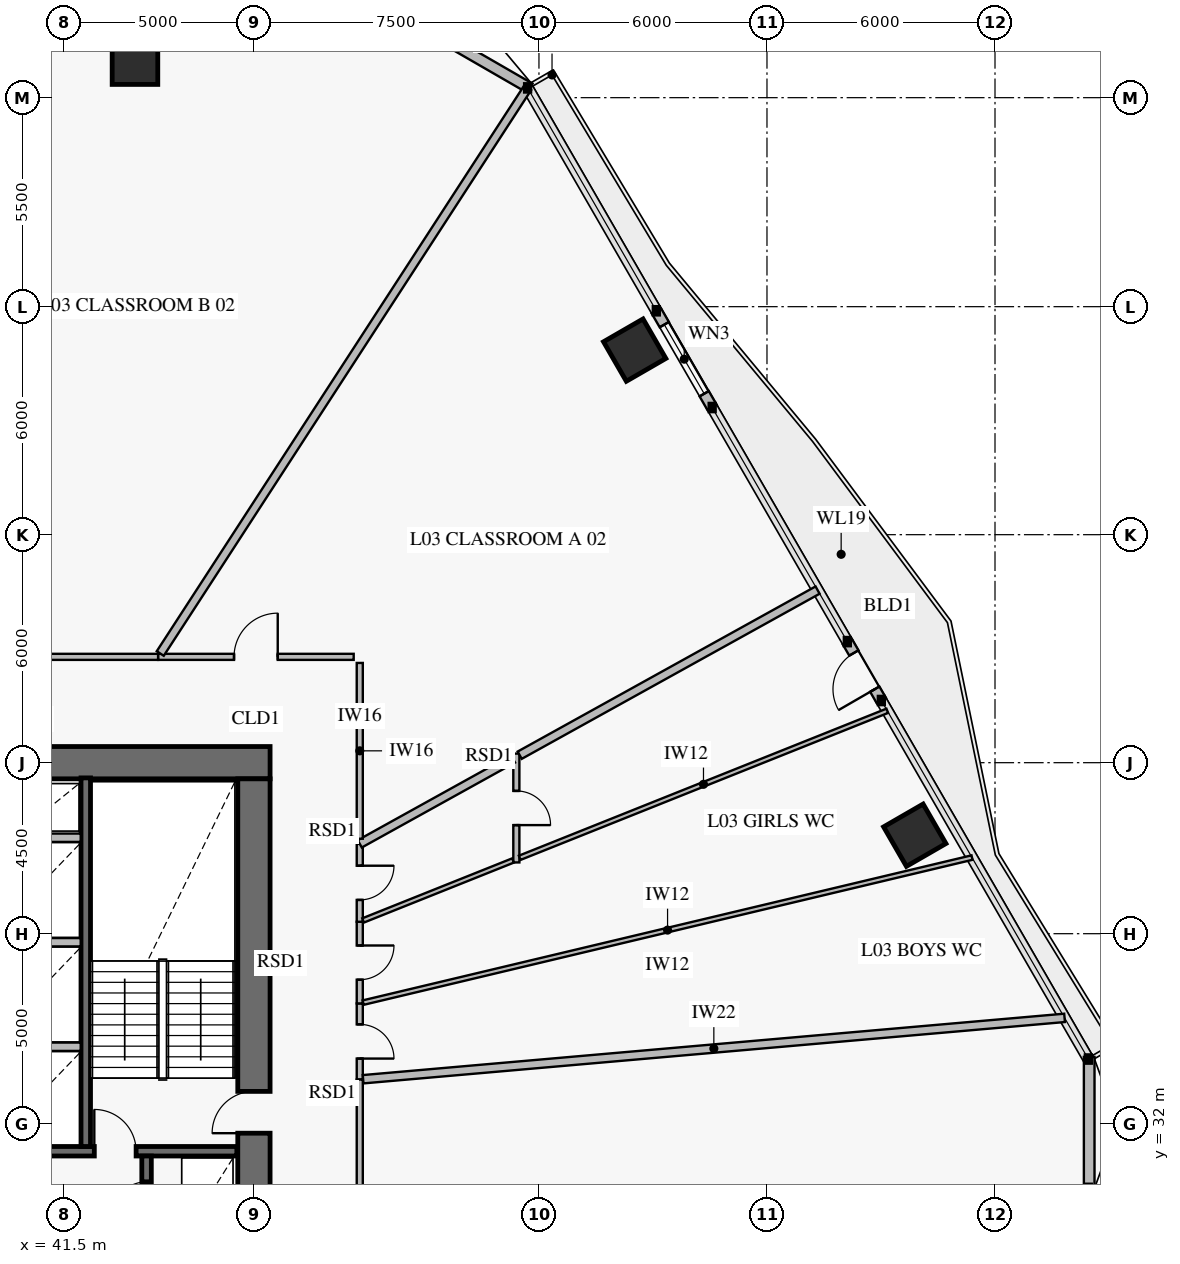
"""IFC4 building model, lengths in metres.
Left out: names, types, materials, properties, quantities, classifications, styles, units other than length and angle.
Written with IfcOpenShell. Run it as: python <this file> out.ifc"""

import sys

from ifc_helpers import new_model, si_unit, direction, frame, frame_2d, origin, origin_2d, place, context, subcontext, project, spatial, rectangle, extrude, element, fill, save


model = new_model("IFC4")
c1 = context("Model", 3, precision=1e-05, world=origin(), true_north=direction((0.0, 1.0)))
c2 = subcontext(c1, "Body", "Model", "MODEL_VIEW")
j1 = project(units=[si_unit("LENGTHUNIT", "METRE"), si_unit("PLANEANGLEUNIT", "RADIAN")], contexts=[c1])
p1 = place(None, origin())
s1 = spatial("IfcSite", under=j1, at=p1, CompositionType="ELEMENT")
p2 = place(p1, origin())
s2 = spatial("IfcBuilding", under=s1, at=p2, CompositionType="ELEMENT")
p3 = place(p2, frame((0.0, 0.0, 12.0)))
s3 = spatial("IfcBuildingStorey", under=s2, at=p3, CompositionType="ELEMENT", Elevation=12.0)
p4 = place(p3, frame((46.925, 41.5, 0.0), z_axis=(0.0, 0.0, 1.0), x_axis=(-1.0, 0.0, 0.0)))
e1 = element("IfcWall", 1, at=p4, inside=s3, PredefinedType="SHEAR", context=c2, shape_type="SweptSolid", body=[
    extrude(rectangle(XDim=7.975, YDim=0.85, at=frame_2d((3.988, 0.0))), origin(), (0.0, 0.0, 1.0), 4.2),
])
p5 = place(p3, frame((46.5, 22.925, 0.0), z_axis=(0.0, 0.0, 1.0), x_axis=(0.0, 1.0, 0.0)))
e2 = element("IfcWall", 2, at=p5, inside=s3, PredefinedType="SHEAR", context=c2, shape_type="SweptSolid", body=[
    extrude(rectangle(XDim=18.15, YDim=0.85, at=frame_2d((9.075, 0.0))), origin(), (0.0, 0.0, 1.0), 4.2),
])
p6 = place(p5, frame((8.825, 0.0, 0.0)))
e3 = element("IfcOpeningElement", 3, at=p6, cuts=e2, PredefinedType="OPENING", context=c2, shape_type="SweptSolid", body=[
    extrude(rectangle(XDim=1.1, YDim=2.15, at=frame_2d((0.55, 1.075))), frame((0.0, 0.437, 0.0), z_axis=(0.0, -1.0, 0.0), x_axis=(1.0, 0.0, 0.0)), (0.0, 0.0, 1.0), 0.874),
])
for number, where, z_axis, x_axis in (
    (4, (63.889, 39.592, 0.0), (0.0, 0.0, 1.0), (-0.5, 0.866, 0.0)),
    (5, (56.519, 52.357, 0.0), (0.0, 0.0, 1.0), (-0.5, 0.866, 0.0)),
    (6, (43.37, 59.948, 0.0), (0.0, 0.0, 1.0), (-1.0, 0.0, 0.0)),
):
    element("IfcColumn", number, at=place(p3, frame(where, z_axis=z_axis, x_axis=x_axis)), inside=s3, PredefinedType="COLUMN", context=c2, shape_type="SweptSolid", body=[
        extrude(rectangle(XDim=1.2, YDim=1.2, at=origin_2d()), origin(), (0.0, 0.0, 1.0), 3.92),
    ])
p7 = place(p3, frame((50.717, 61.006, 0.0), z_axis=(0.0, 0.0, 1.0), x_axis=(0.866007452331, -0.500031091541, 0.0)))
e7 = element("IfcWall", 7, at=p7, inside=s3, PredefinedType="SOLIDWALL", context=c2, shape_type="SweptSolid", body=[
    extrude(rectangle(XDim=3.515, YDim=0.28, at=frame_2d((1.757, 0.0))), origin(), (0.0, 0.0, 1.0), 3.92),
])
p8 = place(p3, frame((57.088, 53.392, 0.0), z_axis=(0.0, 0.0, 1.0), x_axis=(0.500024377727, -0.866011328839, 0.0)))
e8 = element("IfcWall", 8, at=p8, inside=s3, PredefinedType="SOLIDWALL", context=c2, shape_type="SweptSolid", body=[
    extrude(rectangle(XDim=2.94, YDim=0.28, at=frame_2d((1.47, 0.0))), origin(), (0.0, 0.0, 1.0), 3.492),
])
p9 = place(p8, frame((0.42, 0.0, 0.7)))
e9 = element("IfcOpeningElement", 9, at=p9, cuts=e8, PredefinedType="OPENING", context=c2, shape_type="SweptSolid", body=[
    extrude(rectangle(XDim=2.1, YDim=1.5, at=frame_2d((1.05, 0.75))), frame((0.0, 0.152, 0.0), z_axis=(0.0, -1.0, 0.0), x_axis=(1.0, 0.0, 0.0)), (0.0, 0.0, 1.0), 0.304),
])
p10 = place(p3, frame((62.114, 44.686, 0.0), z_axis=(0.0, 0.0, 1.0), x_axis=(0.499982180423, -0.866035691677, 0.0)))
e10 = element("IfcWall", 10, at=p10, inside=s3, PredefinedType="SOLIDWALL", context=c2, shape_type="SweptSolid", body=[
    extrude(rectangle(XDim=1.79, YDim=0.28, at=frame_2d((0.895, 0.0))), origin(), (0.0, 0.0, 1.0), 3.92),
])
p11 = place(p10, frame((0.345, 0.0, 0.0)))
e11 = element("IfcOpeningElement", 11, at=p11, cuts=e10, PredefinedType="OPENING", context=c2, shape_type="SweptSolid", body=[
    extrude(rectangle(XDim=1.1, YDim=2.2, at=frame_2d((0.55, 1.1))), frame((0.0, 0.152, 0.0), z_axis=(0.0, -1.0, 0.0), x_axis=(1.0, 0.0, 0.0)), (0.0, 0.0, 1.0), 0.304),
])
p12 = place(p3, frame((68.479, 33.758, 0.0), z_axis=(0.0, 0.0, 1.0), x_axis=(0.0, -1.0, 0.0)))
e12 = element("IfcWall", 12, at=p12, inside=s3, PredefinedType="SOLIDWALL", context=c2, shape_type="SweptSolid", body=[
    extrude(rectangle(XDim=3.515, YDim=0.28, at=frame_2d((1.758, 0.0))), origin(), (0.0, 0.0, 1.0), 3.92),
])
p13 = place(p3, frame((25.95, 31.275, 0.0), z_axis=(0.0, 0.0, 1.0), x_axis=(1.0, 0.0, 0.0)))
e13 = element("IfcWall", 13, at=p13, inside=s3, PredefinedType="SOLIDWALL", context=c2, shape_type="SweptSolid", body=[
    extrude(rectangle(XDim=20.1, YDim=0.25, at=frame_2d((10.05, 0.0))), origin(), (0.0, 0.0, 1.0), 4.2),
])
p14 = place(p13, frame((2.6, 0.0, 0.0)))
e14 = element("IfcOpeningElement", 14, at=p14, cuts=e13, PredefinedType="OPENING", context=c2, shape_type="SweptSolid", body=[
    extrude(rectangle(XDim=1.1, YDim=2.15, at=frame_2d((0.55, 1.075))), frame((0.0, 0.137, 0.0), z_axis=(0.0, -1.0, 0.0), x_axis=(1.0, 0.0, 0.0)), (0.0, 0.0, 1.0), 0.274),
])
p15 = place(p13, frame((10.6, 0.0, 0.0)))
e15 = element("IfcOpeningElement", 15, at=p15, cuts=e13, PredefinedType="OPENING", context=c2, shape_type="SweptSolid", body=[
    extrude(rectangle(XDim=1.1, YDim=2.15, at=frame_2d((0.55, 1.075))), frame((0.0, 0.137, 0.0), z_axis=(0.0, -1.0, 0.0), x_axis=(1.0, 0.0, 0.0)), (0.0, 0.0, 1.0), 0.274),
])
p16 = place(p13, frame((16.35, 0.0, 0.0)))
e16 = element("IfcOpeningElement", 16, at=p16, cuts=e13, PredefinedType="OPENING", context=c2, shape_type="SweptSolid", body=[
    extrude(rectangle(XDim=1.1, YDim=2.15, at=frame_2d((0.55, 1.075))), frame((0.0, 0.137, 0.0), z_axis=(0.0, -1.0, 0.0), x_axis=(1.0, 0.0, 0.0)), (0.0, 0.0, 1.0), 0.274),
])
p17 = place(p3, frame((42.075, 31.4, 0.0), z_axis=(0.0, 0.0, 1.0), x_axis=(0.0, 1.0, 0.0)))
e17 = element("IfcWall", 17, at=p17, inside=s3, PredefinedType="SOLIDWALL", context=c2, shape_type="SweptSolid", body=[
    extrude(rectangle(XDim=9.7, YDim=0.25, at=frame_2d((4.85, 0.0))), origin(), (0.0, 0.0, 1.0), 4.2),
])
p18 = place(p3, frame((43.675, 22.95, 0.0), z_axis=(0.0, 0.0, 1.0), x_axis=(0.0, 1.0, 0.0)))
e18 = element("IfcWall", 18, at=p18, inside=s3, PredefinedType="SOLIDWALL", context=c2, shape_type="SweptSolid", body=[
    extrude(rectangle(XDim=8.2, YDim=0.25, at=frame_2d((4.1, 0.0))), origin(), (0.0, 0.0, 1.0), 4.2),
])
p19 = place(p18, frame((0.75, 0.0, 0.0)))
e19 = element("IfcOpeningElement", 19, at=p19, cuts=e18, PredefinedType="OPENING", context=c2, shape_type="SweptSolid", body=[
    extrude(rectangle(XDim=1.3, YDim=2.3, at=frame_2d((0.65, 1.15))), frame((0.0, 0.137, 0.0), z_axis=(0.0, -1.0, 0.0), x_axis=(1.0, 0.0, 0.0)), (0.0, 0.0, 1.0), 0.274),
])
p20 = place(p18, frame((3.7, 0.0, 0.0)))
e20 = element("IfcOpeningElement", 20, at=p20, cuts=e18, PredefinedType="OPENING", context=c2, shape_type="SweptSolid", body=[
    extrude(rectangle(XDim=1.3, YDim=2.3, at=frame_2d((0.65, 1.15))), frame((0.0, 0.137, 0.0), z_axis=(0.0, -1.0, 0.0), x_axis=(1.0, 0.0, 0.0)), (0.0, 0.0, 1.0), 0.274),
])
p21 = place(p18, frame((6.62, 0.0, 0.0)))
e21 = element("IfcOpeningElement", 21, at=p21, cuts=e18, PredefinedType="OPENING", context=c2, shape_type="SweptSolid", body=[
    extrude(rectangle(XDim=0.9, YDim=2.1, at=frame_2d((0.45, 1.05))), frame((0.0, 0.137, 0.0), z_axis=(0.0, -1.0, 0.0), x_axis=(1.0, 0.0, 0.0)), (0.0, 0.0, 1.0), 0.274),
])
p22 = place(p3, frame((49.285, 33.162, 0.0), z_axis=(0.0, 0.0, 1.0), x_axis=(0.0, 1.0, 0.0)))
e22 = element("IfcWall", 22, at=p22, inside=s3, PredefinedType="PARTITIONING", context=c2, shape_type="SweptSolid", body=[
    extrude(rectangle(XDim=2.002, YDim=0.16, at=frame_2d((1.001, 0.0))), origin(), (0.0, 0.0, 1.0), 3.92),
])
p23 = place(p22, frame((0.551, 0.0, 0.0)))
e23 = element("IfcOpeningElement", 23, at=p23, cuts=e22, PredefinedType="OPENING", context=c2, shape_type="SweptSolid", body=[
    extrude(rectangle(XDim=0.9, YDim=2.1, at=frame_2d((0.45, 1.05))), frame((0.0, 0.092, 0.0), z_axis=(0.0, -1.0, 0.0), x_axis=(1.0, 0.0, 0.0)), (0.0, 0.0, 1.0), 0.184),
])
p24 = place(p3, frame((49.285, 35.165, 0.0), z_axis=(0.0, 0.0, 1.0), x_axis=(0.0, 1.0, 0.0)))
e24 = element("IfcWall", 24, at=p24, inside=s3, PredefinedType="PARTITIONING", context=c2, shape_type="SweptSolid", body=[
    extrude(rectangle(XDim=2.149, YDim=0.16, at=frame_2d((1.074, 0.0))), origin(), (0.0, 0.0, 1.0), 3.22),
])
p25 = place(p24, frame((0.624, 0.0, 0.0)))
e25 = element("IfcOpeningElement", 25, at=p25, cuts=e24, PredefinedType="OPENING", context=c2, shape_type="SweptSolid", body=[
    extrude(rectangle(XDim=0.9, YDim=2.1, at=frame_2d((0.45, 1.05))), frame((0.0, 0.092, 0.0), z_axis=(0.0, -1.0, 0.0), x_axis=(1.0, 0.0, 0.0)), (0.0, 0.0, 1.0), 0.184),
])
p26 = place(p3, frame((53.405, 41.739, 0.0), z_axis=(0.0, 0.0, 1.0), x_axis=(0.0, -1.0, 0.0)))
e26 = element("IfcWall", 26, at=p26, inside=s3, PredefinedType="PARTITIONING", context=c2, shape_type="SweptSolid", body=[
    extrude(rectangle(XDim=2.864, YDim=0.16, at=frame_2d((1.432, 0.0))), origin(), (0.0, 0.0, 1.0), 3.92),
])
p27 = place(p26, frame((0.982, 0.0, 0.0)))
e27 = element("IfcOpeningElement", 27, at=p27, cuts=e26, PredefinedType="OPENING", context=c2, shape_type="SweptSolid", body=[
    extrude(rectangle(XDim=0.9, YDim=2.1, at=frame_2d((0.45, 1.05))), frame((0.0, 0.092, 0.0), z_axis=(0.0, -1.0, 0.0), x_axis=(1.0, 0.0, 0.0)), (0.0, 0.0, 1.0), 0.184),
])
p28 = place(p3, frame((49.285, 37.314, 0.0), z_axis=(0.0, 0.0, 1.0), x_axis=(0.0, 1.0, 0.0)))
e28 = element("IfcWall", 28, at=p28, inside=s3, PredefinedType="PARTITIONING", context=c2, shape_type="SweptSolid", body=[
    extrude(rectangle(XDim=2.05, YDim=0.16, at=frame_2d((1.025, 0.0))), origin(), (0.0, 0.0, 1.0), 3.92),
])
p29 = place(p28, frame((0.575, 0.0, 0.0)))
e29 = element("IfcOpeningElement", 29, at=p29, cuts=e28, PredefinedType="OPENING", context=c2, shape_type="SweptSolid", body=[
    extrude(rectangle(XDim=0.9, YDim=2.1, at=frame_2d((0.45, 1.05))), frame((0.0, 0.092, 0.0), z_axis=(0.0, -1.0, 0.0), x_axis=(1.0, 0.0, 0.0)), (0.0, 0.0, 1.0), 0.184),
])
p30 = place(p3, frame((49.125, 44.285, 0.0), z_axis=(0.0, 0.0, 1.0), x_axis=(-1.0, 0.0, 0.0)))
e30 = element("IfcWall", 30, at=p30, inside=s3, PredefinedType="PARTITIONING", context=c2, shape_type="SweptSolid", body=[
    extrude(rectangle(XDim=5.147, YDim=0.16, at=frame_2d((2.573, 0.0))), origin(), (0.0, 0.0, 1.0), 3.22),
])
p31 = place(p30, frame((1.999, 0.0, 0.0)))
e31 = element("IfcOpeningElement", 31, at=p31, cuts=e30, PredefinedType="OPENING", context=c2, shape_type="SweptSolid", body=[
    extrude(rectangle(XDim=1.15, YDim=2.2, at=frame_2d((0.575, 1.1))), frame((0.0, 0.092, 0.0), z_axis=(0.0, -1.0, 0.0), x_axis=(1.0, 0.0, 0.0)), (0.0, 0.0, 1.0), 0.184),
])
p32 = place(p3, frame((43.978, 44.285, 0.0), z_axis=(0.0, 0.0, 1.0), x_axis=(-1.0, 0.0, 0.0)))
e32 = element("IfcWall", 32, at=p32, inside=s3, PredefinedType="PARTITIONING", context=c2, shape_type="SweptSolid", body=[
    extrude(rectangle(XDim=6.903, YDim=0.16, at=frame_2d((3.452, 0.0))), origin(), (0.0, 0.0, 1.0), 3.22),
])
p33 = place(p32, frame((2.877, 0.0, 0.0)))
e33 = element("IfcOpeningElement", 33, at=p33, cuts=e32, PredefinedType="OPENING", context=c2, shape_type="SweptSolid", body=[
    extrude(rectangle(XDim=1.15, YDim=2.2, at=frame_2d((0.575, 1.1))), frame((0.0, 0.092, 0.0), z_axis=(0.0, -1.0, 0.0), x_axis=(1.0, 0.0, 0.0)), (0.0, 0.0, 1.0), 0.184),
])
p34 = place(p3, frame((49.285, 20.451, 0.0), z_axis=(0.0, 0.0, 1.0), x_axis=(0.0, 1.0, 0.0)))
e34 = element("IfcWall", 34, at=p34, inside=s3, PredefinedType="PARTITIONING", context=c2, shape_type="SweptSolid", body=[
    extrude(rectangle(XDim=12.711, YDim=0.16, at=frame_2d((6.355, 0.0))), origin(), (0.0, 0.0, 1.0), 3.22),
])
p35 = place(p34, frame((5.88, 0.0, 0.0)))
e35 = element("IfcOpeningElement", 35, at=p35, cuts=e34, PredefinedType="OPENING", context=c2, shape_type="SweptSolid", body=[
    extrude(rectangle(XDim=0.95, YDim=2.1, at=frame_2d((0.475, 1.05))), frame((0.0, 0.092, 0.0), z_axis=(0.0, -1.0, 0.0), x_axis=(1.0, 0.0, 0.0)), (0.0, 0.0, 1.0), 0.184),
])
for number, where, z_axis, x_axis in (
    (36, (39.558, 34.025, 0.0), (0.0, 0.0, 1.0), (1.0, 0.0, 0.0)),
    (37, (39.558, 36.775, 0.0), (0.0, 0.0, 1.0), (1.0, 0.0, 0.0)),
    (38, (39.558, 39.525, 0.0), (0.0, 0.0, 1.0), (1.0, 0.0, 0.0)),
):
    element("IfcWall", number, at=place(p3, frame(where, z_axis=z_axis, x_axis=x_axis)), inside=s3, PredefinedType="PARTITIONING", context=c2, shape_type="SweptSolid", body=[
        extrude(rectangle(XDim=2.384, YDim=0.22, at=frame_2d((1.192, 0.0))), origin(), (0.0, 0.0, 1.0), 3.92),
    ])
p36 = place(p3, frame((49.373, 33.17, 0.0), z_axis=(0.0, 0.0, 1.0), x_axis=(0.99619391773, 0.087164661858, 0.0)))
e39 = element("IfcWall", 39, at=p36, inside=s3, PredefinedType="PARTITIONING", context=c2, shape_type="SweptSolid", body=[
    extrude(rectangle(XDim=18.528, YDim=0.22, at=frame_2d((9.264, 0.0))), origin(), (0.0, 0.0, 1.0), 3.17),
])
p37 = place(p3, frame((49.373, 35.186, 0.0), z_axis=(0.0, 0.0, 1.0), x_axis=(0.972774396977, 0.231754120968, 0.0)))
e40 = element("IfcWall", 40, at=p37, inside=s3, PredefinedType="PARTITIONING", context=c2, shape_type="SweptSolid", body=[
    extrude(rectangle(XDim=16.471, YDim=0.12, at=frame_2d((8.235, 0.0))), origin(), (0.0, 0.0, 1.0), 3.17),
])
p38 = place(p3, frame((49.373, 37.349, 0.0), z_axis=(0.0, 0.0, 1.0), x_axis=(0.928488582268, 0.371360946517, 0.0)))
e41 = element("IfcWall", 41, at=p38, inside=s3, PredefinedType="PARTITIONING", context=c2, shape_type="SweptSolid", body=[
    extrude(rectangle(XDim=4.248, YDim=0.12, at=frame_2d((2.124, 0.0))), origin(), (0.0, 0.0, 1.0), 3.92),
])
p39 = place(p3, frame((53.493, 38.997, 0.0), z_axis=(0.0, 0.0, 1.0), x_axis=(0.928486388213, 0.371366432117, 0.0)))
e42 = element("IfcWall", 42, at=p39, inside=s3, PredefinedType="PARTITIONING", context=c2, shape_type="SweptSolid", body=[
    extrude(rectangle(XDim=10.417, YDim=0.12, at=frame_2d((5.208, 0.0))), origin(), (0.0, 0.0, 1.0), 3.17),
])
p40 = place(p3, frame((49.285, 39.364, 0.0), z_axis=(0.0, 0.0, 1.0), x_axis=(0.874606547494, 0.484833360115, 0.0)))
e43 = element("IfcWall", 43, at=p40, inside=s3, PredefinedType="PARTITIONING", context=c2, shape_type="SweptSolid", body=[
    extrude(rectangle(XDim=4.61, YDim=0.22, at=frame_2d((2.305, 0.0))), origin(), (0.0, 0.0, 1.0), 3.92),
])
p41 = place(p3, frame((53.493, 41.697, 0.0), z_axis=(0.0, 0.0, 1.0), x_axis=(0.874622025543, 0.484805437711, 0.0)))
e44 = element("IfcWall", 44, at=p41, inside=s3, PredefinedType="PARTITIONING", context=c2, shape_type="SweptSolid", body=[
    extrude(rectangle(XDim=8.962, YDim=0.22, at=frame_2d((4.481, 0.0))), origin(), (0.0, 0.0, 1.0), 3.17),
])
p42 = place(p3, frame((44.035, 44.373, 0.0), z_axis=(0.0, 0.0, 1.0), x_axis=(0.544634848015, 0.838673287, 0.0)))
e45 = element("IfcWall", 45, at=p42, inside=s3, PredefinedType="PARTITIONING", context=c2, shape_type="SweptSolid", body=[
    extrude(rectangle(XDim=17.748, YDim=0.22, at=frame_2d((8.874, 0.0))), origin(), (0.0, 0.0, 1.0), 3.17),
])
p43 = place(p3, frame((49.285, 39.499, 0.0), z_axis=(0.0, 0.0, 1.0), x_axis=(0.0, 1.0, 0.0)))
e46 = element("IfcWall", 46, at=p43, inside=s3, PredefinedType="PARTITIONING", context=c2, shape_type="SweptSolid", body=[
    extrude(rectangle(XDim=4.626, YDim=0.16, at=frame_2d((2.313, 0.0))), origin(), (0.0, 0.0, 1.0), 3.92),
])
p44 = place(p9, origin())
e47 = element("IfcWindow", 47, at=p44, inside=s3, PartitioningType="SINGLE_PANEL", PredefinedType="WINDOW", context=c2, shape_type="SweptSolid", body=[
    extrude(rectangle(XDim=2.1, YDim=1.5, at=frame_2d((1.05, 0.75))), frame((0.0, 0.03, 0.0), z_axis=(0.0, -1.0, 0.0), x_axis=(1.0, 0.0, 0.0)), (0.0, 0.0, 1.0), 0.06),
])
fill(e9, e47)
p45 = place(p11, frame((1.1, 0.0, 0.0), z_axis=(0.0, 0.0, 1.0), x_axis=(-1.0, 0.0, 0.0)))
e48 = element("IfcDoor", 48, at=p45, inside=s3, OperationType="SINGLE_SWING_LEFT", PredefinedType="DOOR", context=c2, shape_type="SweptSolid", body=[
    extrude(rectangle(XDim=1.1, YDim=2.2, at=frame_2d((0.55, 1.1))), frame((0.0, 0.025, 0.0), z_axis=(0.0, -1.0, 0.0), x_axis=(1.0, 0.0, 0.0)), (0.0, 0.0, 1.0), 0.05),
])
fill(e11, e48)
p46 = place(p6, origin())
e49 = element("IfcDoor", 49, at=p46, inside=s3, OperationType="SINGLE_SWING_LEFT", PredefinedType="USERDEFINED", context=c2, shape_type="SweptSolid", body=[
    extrude(rectangle(XDim=1.1, YDim=2.15, at=frame_2d((0.55, 1.075))), frame((0.0, 0.025, 0.0), z_axis=(0.0, -1.0, 0.0), x_axis=(1.0, 0.0, 0.0)), (0.0, 0.0, 1.0), 0.05),
])
fill(e3, e49)
p47 = place(p16, origin())
e50 = element("IfcDoor", 50, at=p47, inside=s3, OperationType="SINGLE_SWING_LEFT", PredefinedType="USERDEFINED", context=c2, shape_type="SweptSolid", body=[
    extrude(rectangle(XDim=1.1, YDim=2.15, at=frame_2d((0.55, 1.075))), frame((0.0, 0.025, 0.0), z_axis=(0.0, -1.0, 0.0), x_axis=(1.0, 0.0, 0.0)), (0.0, 0.0, 1.0), 0.05),
])
fill(e16, e50)
p48 = place(p21, origin())
e51 = element("IfcDoor", 51, at=p48, inside=s3, OperationType="SINGLE_SWING_LEFT", PredefinedType="DOOR", context=c2, shape_type="SweptSolid", body=[
    extrude(rectangle(XDim=0.9, YDim=2.1, at=frame_2d((0.45, 1.05))), frame((0.0, 0.025, 0.0), z_axis=(0.0, -1.0, 0.0), x_axis=(1.0, 0.0, 0.0)), (0.0, 0.0, 1.0), 0.05),
])
fill(e21, e51)
p49 = place(p23, frame((0.9, 0.0, 0.0), z_axis=(0.0, 0.0, 1.0), x_axis=(-1.0, 0.0, 0.0)))
e52 = element("IfcDoor", 52, at=p49, inside=s3, OperationType="SINGLE_SWING_RIGHT", PredefinedType="DOOR", context=c2, shape_type="SweptSolid", body=[
    extrude(rectangle(XDim=0.9, YDim=2.1, at=frame_2d((0.45, 1.05))), frame((0.0, 0.025, 0.0), z_axis=(0.0, -1.0, 0.0), x_axis=(1.0, 0.0, 0.0)), (0.0, 0.0, 1.0), 0.05),
])
fill(e23, e52)
p50 = place(p25, frame((0.9, 0.0, 0.0), z_axis=(0.0, 0.0, 1.0), x_axis=(-1.0, 0.0, 0.0)))
e53 = element("IfcDoor", 53, at=p50, inside=s3, OperationType="SINGLE_SWING_LEFT", PredefinedType="DOOR", context=c2, shape_type="SweptSolid", body=[
    extrude(rectangle(XDim=0.9, YDim=2.1, at=frame_2d((0.45, 1.05))), frame((0.0, 0.025, 0.0), z_axis=(0.0, -1.0, 0.0), x_axis=(1.0, 0.0, 0.0)), (0.0, 0.0, 1.0), 0.05),
])
fill(e25, e53)
p51 = place(p27, origin())
e54 = element("IfcDoor", 54, at=p51, inside=s3, OperationType="SINGLE_SWING_RIGHT", PredefinedType="DOOR", context=c2, shape_type="SweptSolid", body=[
    extrude(rectangle(XDim=0.9, YDim=2.1, at=frame_2d((0.45, 1.05))), frame((0.0, 0.025, 0.0), z_axis=(0.0, -1.0, 0.0), x_axis=(1.0, 0.0, 0.0)), (0.0, 0.0, 1.0), 0.05),
])
fill(e27, e54)
p52 = place(p29, frame((0.9, 0.0, 0.0), z_axis=(0.0, 0.0, 1.0), x_axis=(-1.0, 0.0, 0.0)))
e55 = element("IfcDoor", 55, at=p52, inside=s3, OperationType="SINGLE_SWING_LEFT", PredefinedType="DOOR", context=c2, shape_type="SweptSolid", body=[
    extrude(rectangle(XDim=0.9, YDim=2.1, at=frame_2d((0.45, 1.05))), frame((0.0, 0.025, 0.0), z_axis=(0.0, -1.0, 0.0), x_axis=(1.0, 0.0, 0.0)), (0.0, 0.0, 1.0), 0.05),
])
fill(e29, e55)
p53 = place(p31, frame((1.15, 0.0, 0.0), z_axis=(0.0, 0.0, 1.0), x_axis=(-1.0, 0.0, 0.0)))
e56 = element("IfcDoor", 56, at=p53, inside=s3, OperationType="SINGLE_SWING_RIGHT", PredefinedType="DOOR", context=c2, shape_type="SweptSolid", body=[
    extrude(rectangle(XDim=1.15, YDim=2.2, at=frame_2d((0.575, 1.1))), frame((0.0, 0.025, 0.0), z_axis=(0.0, -1.0, 0.0), x_axis=(1.0, 0.0, 0.0)), (0.0, 0.0, 1.0), 0.05),
])
fill(e31, e56)
save(model, sys.argv[1])
